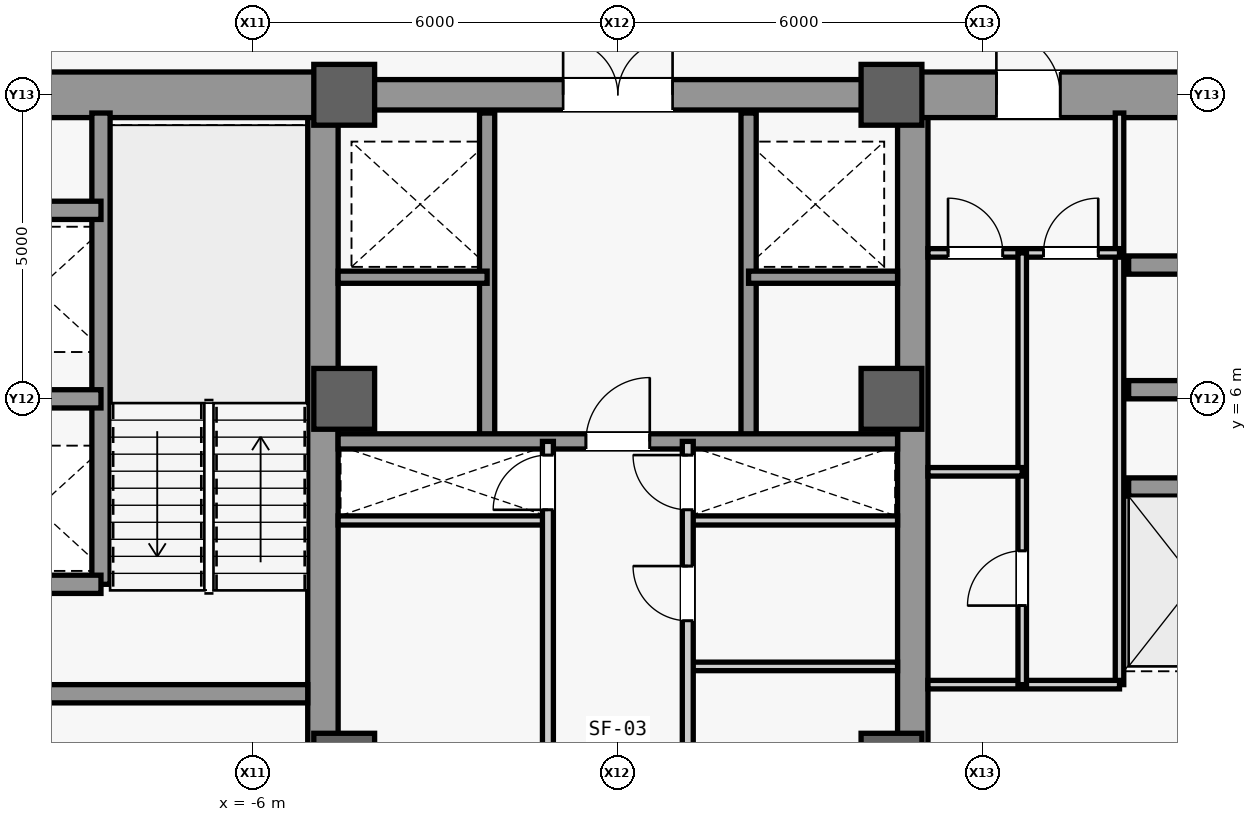
"""IFC4 building model, lengths in metres.
Left out: names, types, materials, properties, quantities, classifications, styles, units other than length and angle.
Written with IfcOpenShell. Run it as: python <this file> out.ifc"""

import sys

from ifc_helpers import new_model, si_unit, direction, frame, frame_2d, origin, origin_2d, place, context, subcontext, project, spatial, rectangle, extrude, source, transform, mapped, element, fill, save


model = new_model("IFC4")
c1 = context("Model", 3, precision=1e-05, world=origin(), true_north=direction((0.0, 1.0)))
c2 = subcontext(c1, "Body", "Model", "MODEL_VIEW")
j1 = project(units=[si_unit("LENGTHUNIT", "METRE"), si_unit("PLANEANGLEUNIT", "RADIAN")], contexts=[c1])
p1 = place(None, origin())
s1 = spatial("IfcSite", under=j1, at=p1, CompositionType="ELEMENT")
p2 = place(p1, origin())
s2 = spatial("IfcBuilding", under=s1, at=p2, CompositionType="ELEMENT")
p3 = place(p2, frame((0.0, 0.0, 91.4)))
s3 = spatial("IfcBuildingStorey", under=s2, at=p3, CompositionType="ELEMENT", Elevation=91.4)
m1 = source(origin(), c2, "Body", "SweptSolid", [
    extrude(rectangle(XDim=21.4, YDim=0.5, at=frame_2d((10.7, 0.0))), origin(), (0.0, 0.0, 1.0), 3.84),
])
for number, where, z_axis, x_axis in (
    (1, (-4.85, -10.7, 0.0), (0.0, 0.0, 1.0), (0.0, 1.0, 0.0)),
    (2, (4.85, -10.7, 0.0), (0.0, 0.0, 1.0), (0.0, 1.0, 0.0)),
):
    element("IfcWall", number, at=place(p3, frame(where, z_axis=z_axis, x_axis=x_axis)), inside=s3, PredefinedType="SHEAR", context=c2, shape_type="MappedRepresentation", body=[
        mapped(m1, transform((0.0, 0.0, 0.0), scale=1.0)),
    ])
m2 = source(origin(), c2, "Body", "SweptSolid", [
    extrude(rectangle(XDim=5.85, YDim=0.75, at=frame_2d((2.925, 0.0))), origin(), (0.0, 0.0, 1.0), 3.84),
])
p4 = place(p3, frame((-10.7, 11.0, 0.0), z_axis=(0.0, 0.0, 1.0), x_axis=(1.0, 0.0, 0.0)))
e3 = element("IfcWall", 3, at=p4, inside=s3, PredefinedType="SHEAR", context=c2, shape_type="MappedRepresentation", body=[
    mapped(m2, transform((0.0, 0.0, 0.0), scale=1.0)),
])
p5 = place(p3, frame((4.85, 11.0, 0.0), z_axis=(0.0, 0.0, 1.0), x_axis=(1.0, 0.0, 0.0)))
e4 = element("IfcWall", 4, at=p5, inside=s3, PredefinedType="SHEAR", context=c2, shape_type="MappedRepresentation", body=[
    mapped(m2, transform((0.0, 0.0, 0.0), scale=1.0)),
])
m3 = source(origin(), c2, "Body", "SweptSolid", [
    extrude(rectangle(XDim=1.05, YDim=2.2, at=frame_2d((0.525, 1.1))), frame((0.0, 0.385, 0.0), z_axis=(0.0, -1.0, 0.0), x_axis=(1.0, 0.0, 0.0)), (0.0, 0.0, 1.0), 0.77),
])
p6 = place(p5, frame((1.375, 0.0, 0.0)))
e5 = element("IfcOpeningElement", 5, at=p6, cuts=e4, PredefinedType="OPENING", context=c2, shape_type="MappedRepresentation", body=[
    mapped(m3, transform((0.0, 0.0, 0.0), scale=1.0)),
])
m4 = source(origin(), c2, "Body", "SweptSolid", [
    extrude(rectangle(XDim=5.6, YDim=0.3, at=frame_2d((2.8, 0.0))), origin(), (0.0, 0.0, 1.0), 3.84),
])
p7 = place(p3, frame((-10.7, 1.15, 0.0), z_axis=(0.0, 0.0, 1.0), x_axis=(1.0, 0.0, 0.0)))
e6 = element("IfcWall", 6, at=p7, inside=s3, PredefinedType="SHEAR", context=c2, shape_type="MappedRepresentation", body=[
    mapped(m4, transform((0.0, 0.0, 0.0), scale=1.0)),
])
m5 = source(origin(), c2, "Body", "SweptSolid", [
    extrude(rectangle(XDim=9.2, YDim=0.5, at=frame_2d((4.6, 0.0))), origin(), (0.0, 0.0, 1.0), 3.84),
])
p8 = place(p3, frame((-4.6, 11.0, 0.0), z_axis=(0.0, 0.0, 1.0), x_axis=(1.0, 0.0, 0.0)))
e7 = element("IfcWall", 7, at=p8, inside=s3, PredefinedType="SHEAR", context=c2, shape_type="MappedRepresentation", body=[
    mapped(m5, transform((0.0, 0.0, 0.0), scale=1.0)),
])
m6 = source(origin(), c2, "Body", "SweptSolid", [
    extrude(rectangle(XDim=1.8, YDim=2.25, at=frame_2d((0.9, 1.125))), frame((0.0, 0.26, 0.0), z_axis=(0.0, -1.0, 0.0), x_axis=(1.0, 0.0, 0.0)), (0.0, 0.0, 1.0), 0.52),
])
p9 = place(p8, frame((3.7, 0.0, 0.0)))
e8 = element("IfcOpeningElement", 8, at=p9, cuts=e7, PredefinedType="OPENING", context=c2, shape_type="MappedRepresentation", body=[
    mapped(m6, transform((0.0, 0.0, 0.0), scale=1.0)),
])
m7 = source(origin(), c2, "Body", "SweptSolid", [
    extrude(rectangle(XDim=1.0, YDim=1.0, at=origin_2d()), origin(), (0.0, 0.0, 1.0), 4.1),
])
for number, where, z_axis, x_axis in (
    (9, (-4.5, 0.0, 0.0), (0.0, 0.0, 1.0), (1.0, 0.0, 0.0)),
    (10, (-4.5, 6.0, 0.0), (0.0, 0.0, 1.0), (1.0, 0.0, 0.0)),
    (11, (-4.5, 11.0, 0.0), (0.0, 0.0, 1.0), (1.0, 0.0, 0.0)),
    (12, (4.5, 0.0, 0.0), (0.0, 0.0, 1.0), (1.0, 0.0, 0.0)),
    (13, (4.5, 6.0, 0.0), (0.0, 0.0, 1.0), (1.0, 0.0, 0.0)),
    (14, (4.5, 11.0, 0.0), (0.0, 0.0, 1.0), (1.0, 0.0, 0.0)),
):
    element("IfcColumn", number, at=place(p3, frame(where, z_axis=z_axis, x_axis=x_axis)), inside=s3, PredefinedType="COLUMN", context=c2, shape_type="MappedRepresentation", body=[
        mapped(m7, transform((0.0, 0.0, 0.0), scale=1.0)),
    ])
m8 = source(origin(), c2, "Body", "SweptSolid", [
    extrude(rectangle(XDim=7.75, YDim=0.3, at=frame_2d((3.875, 0.0))), origin(), (0.0, 0.0, 1.0), 3.84),
])
p10 = place(p3, frame((-8.5, 2.95, 0.0), z_axis=(0.0, 0.0, 1.0), x_axis=(0.0, 1.0, 0.0)))
e15 = element("IfcWall", 15, at=p10, inside=s3, PredefinedType="SHEAR", context=c2, shape_type="MappedRepresentation", body=[
    mapped(m8, transform((0.0, 0.0, 0.0), scale=1.0)),
])
m9 = source(origin(), c2, "Body", "SweptSolid", [
    extrude(rectangle(XDim=2.2, YDim=0.3, at=frame_2d((1.1, 0.0))), origin(), (0.0, 0.0, 1.0), 3.84),
])
for number, where, z_axis, x_axis in (
    (16, (-10.7, 2.95, 0.0), (0.0, 0.0, 1.0), (1.0, 0.0, 0.0)),
    (17, (-10.7, 6.0, 0.0), (0.0, 0.0, 1.0), (1.0, 0.0, 0.0)),
    (18, (-10.7, 9.1, 0.0), (0.0, 0.0, 1.0), (1.0, 0.0, 0.0)),
):
    element("IfcWall", number, at=place(p3, frame(where, z_axis=z_axis, x_axis=x_axis)), inside=s3, PredefinedType="SHEAR", context=c2, shape_type="MappedRepresentation", body=[
        mapped(m9, transform((0.0, 0.0, 0.0), scale=1.0)),
    ])
m10 = source(origin(), c2, "Body", "SweptSolid", [
    extrude(rectangle(XDim=2.3, YDim=0.3, at=frame_2d((1.15, 0.0))), origin(), (0.0, 0.0, 1.0), 3.84),
])
for number, where, z_axis, x_axis in (
    (19, (8.4, 4.55, 0.0), (0.0, 0.0, 1.0), (1.0, 0.0, 0.0)),
    (20, (8.4, 6.15, 0.0), (0.0, 0.0, 1.0), (1.0, 0.0, 0.0)),
    (21, (8.4, 8.2, 0.0), (0.0, 0.0, 1.0), (1.0, 0.0, 0.0)),
):
    element("IfcWall", number, at=place(p3, frame(where, z_axis=z_axis, x_axis=x_axis)), inside=s3, PredefinedType="SHEAR", context=c2, shape_type="MappedRepresentation", body=[
        mapped(m10, transform((0.0, 0.0, 0.0), scale=1.0)),
    ])
m11 = source(origin(), c2, "Body", "SweptSolid", [
    extrude(rectangle(XDim=9.4, YDim=0.14, at=frame_2d((4.7, 0.0))), origin(), (0.0, 0.0, 1.0), 3.84),
])
p11 = place(p3, frame((8.25, 1.3, 0.0), z_axis=(0.0, 0.0, 1.0), x_axis=(0.0, 1.0, 0.0)))
e22 = element("IfcWall", 22, at=p11, inside=s3, PredefinedType="PARTITIONING", context=c2, shape_type="MappedRepresentation", body=[
    mapped(m11, transform((0.0, 0.0, 0.0), scale=1.0)),
])
m12 = source(origin(), c2, "Body", "SweptSolid", [
    extrude(rectangle(XDim=3.15, YDim=0.14, at=frame_2d((1.575, 0.0))), origin(), (0.0, 0.0, 1.0), 3.84),
])
p12 = place(p3, frame((5.1, 1.3, 0.0), z_axis=(0.0, 0.0, 1.0), x_axis=(1.0, 0.0, 0.0)))
e23 = element("IfcWall", 23, at=p12, inside=s3, PredefinedType="PARTITIONING", context=c2, shape_type="MappedRepresentation", body=[
    mapped(m12, transform((0.0, 0.0, 0.0), scale=1.0)),
])
p13 = place(p3, frame((5.1, 8.4, 0.0), z_axis=(0.0, 0.0, 1.0), x_axis=(1.0, 0.0, 0.0)))
e24 = element("IfcWall", 24, at=p13, inside=s3, PredefinedType="PARTITIONING", context=c2, shape_type="MappedRepresentation", body=[
    mapped(m12, transform((0.0, 0.0, 0.0), scale=1.0)),
])
m13 = source(origin(), c2, "Body", "SweptSolid", [
    extrude(rectangle(XDim=0.9, YDim=2.15, at=frame_2d((0.45, 1.075))), frame((0.0, 0.08, 0.0), z_axis=(0.0, -1.0, 0.0), x_axis=(1.0, 0.0, 0.0)), (0.0, 0.0, 1.0), 0.16),
])
p14 = place(p13, frame((0.33, 0.0, 0.0)))
e25 = element("IfcOpeningElement", 25, at=p14, cuts=e24, PredefinedType="OPENING", context=c2, shape_type="MappedRepresentation", body=[
    mapped(m13, transform((0.0, 0.0, 0.0), scale=1.0)),
])
p15 = place(p13, frame((1.9, 0.0, 0.0)))
e26 = element("IfcOpeningElement", 26, at=p15, cuts=e24, PredefinedType="OPENING", context=c2, shape_type="MappedRepresentation", body=[
    mapped(m13, transform((0.0, 0.0, 0.0), scale=1.0)),
])
m14 = source(origin(), c2, "Body", "SweptSolid", [
    extrude(rectangle(XDim=7.1, YDim=0.14, at=frame_2d((3.55, 0.0))), origin(), (0.0, 0.0, 1.0), 3.84),
])
p16 = place(p3, frame((6.65, 1.3, 0.0), z_axis=(0.0, 0.0, 1.0), x_axis=(0.0, 1.0, 0.0)))
e27 = element("IfcWall", 27, at=p16, inside=s3, PredefinedType="PARTITIONING", context=c2, shape_type="MappedRepresentation", body=[
    mapped(m14, transform((0.0, 0.0, 0.0), scale=1.0)),
])
p17 = place(p16, frame((1.3, 0.0, 0.0)))
e28 = element("IfcOpeningElement", 28, at=p17, cuts=e27, PredefinedType="OPENING", context=c2, shape_type="MappedRepresentation", body=[
    mapped(m13, transform((0.0, 0.0, 0.0), scale=1.0)),
])
m15 = source(origin(), c2, "Body", "SweptSolid", [
    extrude(rectangle(XDim=1.55, YDim=0.14, at=frame_2d((0.775, 0.0))), origin(), (0.0, 0.0, 1.0), 3.84),
])
p18 = place(p3, frame((5.1, 4.8, 0.0), z_axis=(0.0, 0.0, 1.0), x_axis=(1.0, 0.0, 0.0)))
e29 = element("IfcWall", 29, at=p18, inside=s3, PredefinedType="PARTITIONING", context=c2, shape_type="MappedRepresentation", body=[
    mapped(m15, transform((0.0, 0.0, 0.0), scale=1.0)),
])
m16 = source(origin(), c2, "Body", "SweptSolid", [
    extrude(rectangle(XDim=3.45, YDim=0.15, at=frame_2d((1.725, 0.0))), origin(), (0.0, 0.0, 1.0), 3.84),
])
for number, where, z_axis, x_axis in (
    (30, (-4.6, 4.0, 0.0), (0.0, 0.0, 1.0), (1.0, 0.0, 0.0)),
    (31, (1.15, 4.0, 0.0), (0.0, 0.0, 1.0), (1.0, 0.0, 0.0)),
):
    element("IfcWall", number, at=place(p3, frame(where, z_axis=z_axis, x_axis=x_axis)), inside=s3, PredefinedType="PARTITIONING", context=c2, shape_type="MappedRepresentation", body=[
        mapped(m16, transform((0.0, 0.0, 0.0), scale=1.0)),
    ])
m17 = source(origin(), c2, "Body", "SweptSolid", [
    extrude(rectangle(XDim=5.4, YDim=0.25, at=frame_2d((2.7, 0.0))), origin(), (0.0, 0.0, 1.0), 3.84),
])
for number, where, z_axis, x_axis in (
    (32, (-2.15, 5.3, 0.0), (0.0, 0.0, 1.0), (0.0, 1.0, 0.0)),
    (33, (2.15, 5.3, 0.0), (0.0, 0.0, 1.0), (0.0, 1.0, 0.0)),
):
    element("IfcWall", number, at=place(p3, frame(where, z_axis=z_axis, x_axis=x_axis)), inside=s3, PredefinedType="SHEAR", context=c2, shape_type="MappedRepresentation", body=[
        mapped(m17, transform((0.0, 0.0, 0.0), scale=1.0)),
    ])
m18 = source(origin(), c2, "Body", "SweptSolid", [
    extrude(rectangle(XDim=2.45, YDim=0.2, at=frame_2d((1.225, 0.0))), origin(), (0.0, 0.0, 1.0), 3.84),
])
for number, where, z_axis, x_axis in (
    (34, (-4.6, 8.0, 0.0), (0.0, 0.0, 1.0), (1.0, 0.0, 0.0)),
    (35, (2.15, 8.0, 0.0), (0.0, 0.0, 1.0), (1.0, 0.0, 0.0)),
):
    element("IfcWall", number, at=place(p3, frame(where, z_axis=z_axis, x_axis=x_axis)), inside=s3, PredefinedType="SHEAR", context=c2, shape_type="MappedRepresentation", body=[
        mapped(m18, transform((0.0, 0.0, 0.0), scale=1.0)),
    ])
m19 = source(origin(), c2, "Body", "SweptSolid", [
    extrude(rectangle(XDim=9.2, YDim=0.25, at=frame_2d((4.6, 0.0))), origin(), (0.0, 0.0, 1.0), 3.84),
])
p19 = place(p3, frame((-4.6, 5.3, 0.0), z_axis=(0.0, 0.0, 1.0), x_axis=(1.0, 0.0, 0.0)))
e36 = element("IfcWall", 36, at=p19, inside=s3, PredefinedType="SHEAR", context=c2, shape_type="MappedRepresentation", body=[
    mapped(m19, transform((0.0, 0.0, 0.0), scale=1.0)),
])
m20 = source(origin(), c2, "Body", "SweptSolid", [
    extrude(rectangle(XDim=1.05, YDim=2.2, at=frame_2d((0.525, 1.1))), frame((0.0, 0.135, 0.0), z_axis=(0.0, -1.0, 0.0), x_axis=(1.0, 0.0, 0.0)), (0.0, 0.0, 1.0), 0.27),
])
p20 = place(p19, frame((4.075, 0.0, 0.0)))
e37 = element("IfcOpeningElement", 37, at=p20, cuts=e36, PredefinedType="OPENING", context=c2, shape_type="MappedRepresentation", body=[
    mapped(m20, transform((0.0, 0.0, 0.0), scale=1.0)),
])
m21 = source(origin(), c2, "Body", "SweptSolid", [
    extrude(rectangle(XDim=10.6, YDim=0.18, at=frame_2d((5.3, 0.0))), origin(), (0.0, 0.0, 1.0), 3.84),
])
p21 = place(p3, frame((-1.15, -5.3, 0.0), z_axis=(0.0, 0.0, 1.0), x_axis=(0.0, 1.0, 0.0)))
e38 = element("IfcWall", 38, at=p21, inside=s3, PredefinedType="PARTITIONING", context=c2, shape_type="MappedRepresentation", body=[
    mapped(m21, transform((0.0, 0.0, 0.0), scale=1.0)),
])
m22 = source(origin(), c2, "Body", "SweptSolid", [
    extrude(rectangle(XDim=0.9, YDim=2.15, at=frame_2d((0.45, 1.075))), frame((0.0, 0.1, 0.0), z_axis=(0.0, -1.0, 0.0), x_axis=(1.0, 0.0, 0.0)), (0.0, 0.0, 1.0), 0.2),
])
p22 = place(p21, frame((4.2, 0.0, 0.0)))
e39 = element("IfcOpeningElement", 39, at=p22, cuts=e38, PredefinedType="OPENING", context=c2, shape_type="MappedRepresentation", body=[
    mapped(m22, transform((0.0, 0.0, 0.0), scale=1.0)),
])
p23 = place(p21, frame((9.475, 0.0, 0.0)))
e40 = element("IfcOpeningElement", 40, at=p23, cuts=e38, PredefinedType="OPENING", context=c2, shape_type="MappedRepresentation", body=[
    mapped(m22, transform((0.0, 0.0, 0.0), scale=1.0)),
])
m23 = source(origin(), c2, "Body", "SweptSolid", [
    extrude(rectangle(XDim=3.45, YDim=0.14, at=frame_2d((1.725, 0.0))), origin(), (0.0, 0.0, 1.0), 3.84),
])
p24 = place(p3, frame((1.15, 1.6, 0.0), z_axis=(0.0, 0.0, 1.0), x_axis=(1.0, 0.0, 0.0)))
e41 = element("IfcWall", 41, at=p24, inside=s3, PredefinedType="PARTITIONING", context=c2, shape_type="MappedRepresentation", body=[
    mapped(m23, transform((0.0, 0.0, 0.0), scale=1.0)),
])
p25 = place(p3, frame((1.15, -5.3, 0.0), z_axis=(0.0, 0.0, 1.0), x_axis=(0.0, 1.0, 0.0)))
e42 = element("IfcWall", 42, at=p25, inside=s3, PredefinedType="PARTITIONING", context=c2, shape_type="MappedRepresentation", body=[
    mapped(m21, transform((0.0, 0.0, 0.0), scale=1.0)),
])
p26 = place(p25, frame((1.15, 0.0, 0.0)))
e43 = element("IfcOpeningElement", 43, at=p26, cuts=e42, PredefinedType="OPENING", context=c2, shape_type="MappedRepresentation", body=[
    mapped(m22, transform((0.0, 0.0, 0.0), scale=1.0)),
])
p27 = place(p25, frame((4.6, 0.0, 0.0)))
e44 = element("IfcOpeningElement", 44, at=p27, cuts=e42, PredefinedType="OPENING", context=c2, shape_type="MappedRepresentation", body=[
    mapped(m22, transform((0.0, 0.0, 0.0), scale=1.0)),
])
p28 = place(p25, frame((7.65, 0.0, 0.0)))
e45 = element("IfcOpeningElement", 45, at=p28, cuts=e42, PredefinedType="OPENING", context=c2, shape_type="MappedRepresentation", body=[
    mapped(m22, transform((0.0, 0.0, 0.0), scale=1.0)),
])
p29 = place(p25, frame((9.475, 0.0, 0.0)))
e46 = element("IfcOpeningElement", 46, at=p29, cuts=e42, PredefinedType="OPENING", context=c2, shape_type="MappedRepresentation", body=[
    mapped(m22, transform((0.0, 0.0, 0.0), scale=1.0)),
])
m24 = source(origin(), c2, "Body", "SweptSolid", [
    extrude(rectangle(XDim=1.05, YDim=2.2, at=frame_2d((0.525, 1.1))), frame((0.0, 0.025, 0.0), z_axis=(0.0, -1.0, 0.0), x_axis=(1.0, 0.0, 0.0)), (0.0, 0.0, 1.0), 0.05),
])
p30 = place(p6, origin())
e47 = element("IfcDoor", 47, at=p30, inside=s3, OperationType="SINGLE_SWING_LEFT", PredefinedType="DOOR", context=c2, shape_type="MappedRepresentation", body=[
    mapped(m24, transform((0.0, 0.0, 0.0), scale=1.0)),
])
fill(e5, e47)
m25 = source(origin(), c2, "Body", "SweptSolid", [
    extrude(rectangle(XDim=0.9, YDim=2.15, at=frame_2d((0.45, 1.075))), frame((0.0, 0.025, 0.0), z_axis=(0.0, -1.0, 0.0), x_axis=(1.0, 0.0, 0.0)), (0.0, 0.0, 1.0), 0.05),
])
p31 = place(p14, origin())
e48 = element("IfcDoor", 48, at=p31, inside=s3, OperationType="SINGLE_SWING_LEFT", PredefinedType="DOOR", context=c2, shape_type="MappedRepresentation", body=[
    mapped(m25, transform((0.0, 0.0, 0.0), scale=1.0)),
])
fill(e25, e48)
p32 = place(p15, origin())
e49 = element("IfcDoor", 49, at=p32, inside=s3, OperationType="SINGLE_SWING_RIGHT", PredefinedType="DOOR", context=c2, shape_type="MappedRepresentation", body=[
    mapped(m25, transform((0.0, 0.0, 0.0), scale=1.0)),
])
fill(e26, e49)
p33 = place(p17, origin())
e50 = element("IfcDoor", 50, at=p33, inside=s3, OperationType="SINGLE_SWING_LEFT", PredefinedType="DOOR", context=c2, shape_type="MappedRepresentation", body=[
    mapped(m25, transform((0.0, 0.0, 0.0), scale=1.0)),
])
fill(e28, e50)
p34 = place(p20, origin())
e51 = element("IfcDoor", 51, at=p34, inside=s3, OperationType="SINGLE_SWING_RIGHT", PredefinedType="DOOR", context=c2, shape_type="MappedRepresentation", body=[
    mapped(m24, transform((0.0, 0.0, 0.0), scale=1.0)),
])
fill(e37, e51)
m26 = source(origin(), c2, "Body", "SweptSolid", [
    extrude(rectangle(XDim=1.8, YDim=2.25, at=frame_2d((0.9, 1.125))), frame((0.0, 0.025, 0.0), z_axis=(0.0, -1.0, 0.0), x_axis=(1.0, 0.0, 0.0)), (0.0, 0.0, 1.0), 0.05),
])
p35 = place(p9, origin())
e52 = element("IfcDoor", 52, at=p35, inside=s3, OperationType="SINGLE_SWING_RIGHT", PredefinedType="DOOR", context=c2, shape_type="MappedRepresentation", body=[
    mapped(m26, transform((0.0, 0.0, 0.0), scale=1.0)),
])
fill(e8, e52)
p36 = place(p28, origin())
e53 = element("IfcDoor", 53, at=p36, inside=s3, OperationType="SINGLE_SWING_RIGHT", PredefinedType="DOOR", context=c2, shape_type="MappedRepresentation", body=[
    mapped(m25, transform((0.0, 0.0, 0.0), scale=1.0)),
])
fill(e45, e53)
p37 = place(p23, origin())
e54 = element("IfcDoor", 54, at=p37, inside=s3, OperationType="SINGLE_SWING_LEFT", PredefinedType="DOOR", context=c2, shape_type="MappedRepresentation", body=[
    mapped(m25, transform((0.0, 0.0, 0.0), scale=1.0)),
])
fill(e40, e54)
p38 = place(p29, origin())
e55 = element("IfcDoor", 55, at=p38, inside=s3, OperationType="SINGLE_SWING_RIGHT", PredefinedType="DOOR", context=c2, shape_type="MappedRepresentation", body=[
    mapped(m25, transform((0.0, 0.0, 0.0), scale=1.0)),
])
fill(e46, e55)
save(model, sys.argv[1])
